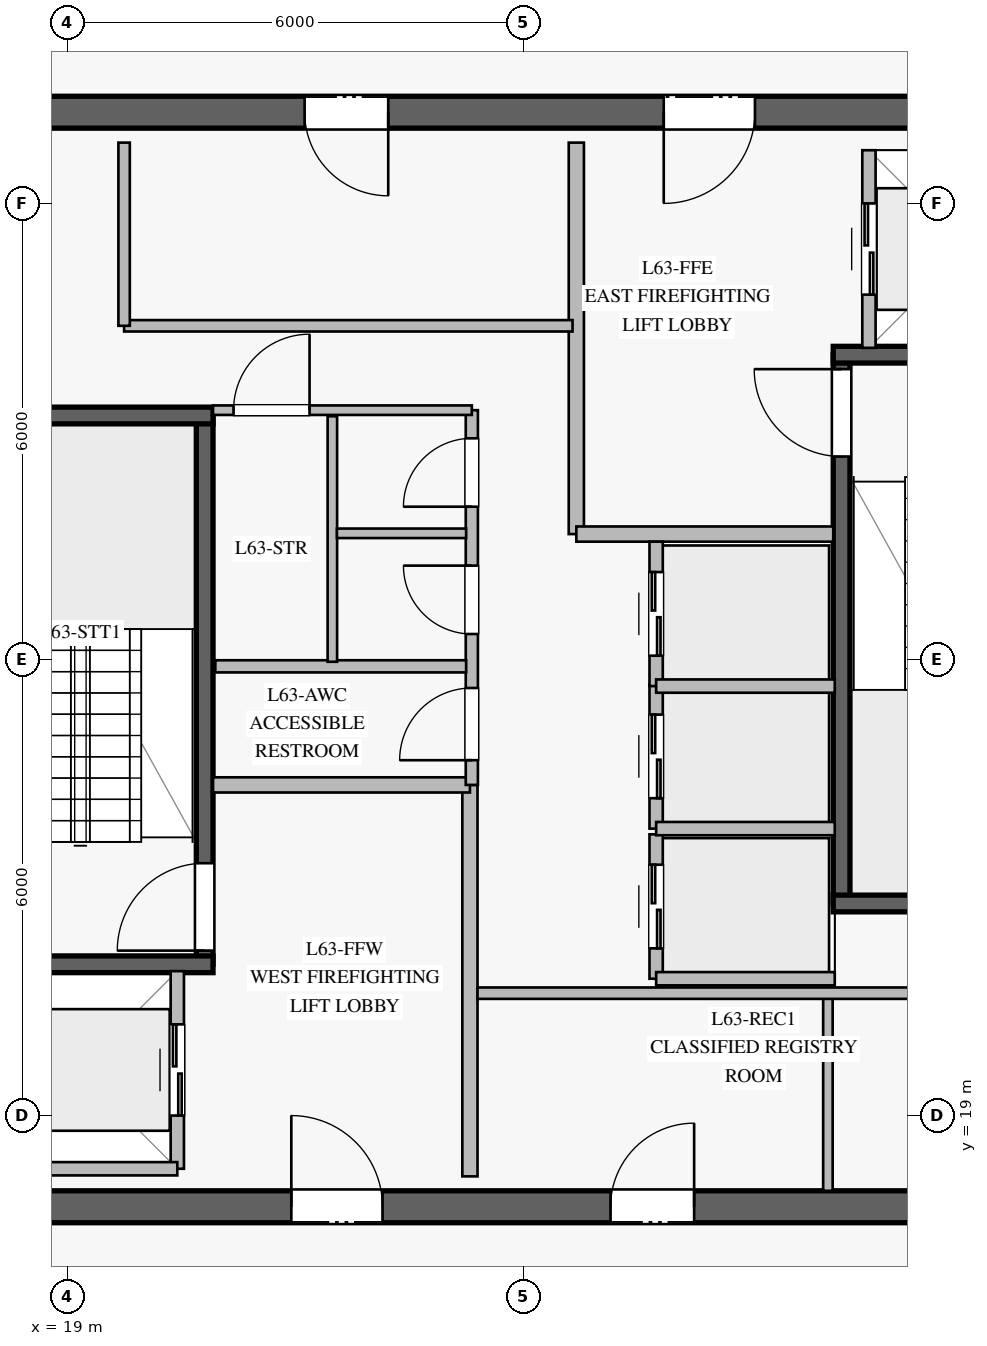
"""IFC4 building model, lengths in metres.
Left out: names, types, materials, properties, quantities, classifications, styles, units other than length and angle.
Written with IfcOpenShell. Run it as: python <this file> out.ifc"""

import sys

from ifc_helpers import new_model, si_unit, direction, frame, frame_2d, origin, place, context, subcontext, project, spatial, rectangle, extrude, element, fill, save


model = new_model("IFC4")
c1 = context("Model", 3, precision=1e-05, world=origin(), true_north=direction((0.0, 1.0)))
c2 = subcontext(c1, "Body", "Model", "MODEL_VIEW")
j1 = project(units=[si_unit("LENGTHUNIT", "METRE"), si_unit("PLANEANGLEUNIT", "RADIAN")], contexts=[c1])
p1 = place(None, origin())
s1 = spatial("IfcSite", under=j1, at=p1, CompositionType="ELEMENT")
p2 = place(p1, origin())
s2 = spatial("IfcBuilding", under=s1, at=p2, CompositionType="ELEMENT")
p3 = place(p2, frame((0.0, 0.0, 262.2)))
s3 = spatial("IfcBuildingStorey", under=s2, at=p3, CompositionType="ELEMENT", Elevation=262.2)
p4 = place(p3, frame((16.99, 17.8, 0.0), z_axis=(0.0, 0.0, 1.0), x_axis=(1.0, 0.0, 0.0)))
e1 = element("IfcWall", 1, at=p4, inside=s3, PredefinedType="SHEAR", context=c2, shape_type="SweptSolid", body=[
    extrude(rectangle(XDim=16.02, YDim=0.42, at=frame_2d((8.01, 0.0))), origin(), (0.0, 0.0, 1.0), 3.78),
])
p5 = place(p4, frame((4.96, 0.0, 0.0)))
e2 = element("IfcOpeningElement", 2, at=p5, cuts=e1, PredefinedType="OPENING", context=c2, shape_type="SweptSolid", body=[
    extrude(rectangle(XDim=1.2, YDim=2.25, at=frame_2d((0.6, 1.125))), frame((0.0, 0.22, 0.0), z_axis=(0.0, -1.0, 0.0), x_axis=(1.0, 0.0, 0.0)), (0.0, 0.0, 1.0), 0.44),
])
p6 = place(p4, frame((13.91, 0.0, 0.0)))
e3 = element("IfcOpeningElement", 3, at=p6, cuts=e1, PredefinedType="OPENING", context=c2, shape_type="SweptSolid", body=[
    extrude(rectangle(XDim=0.9, YDim=2.1, at=frame_2d((0.45, 1.05))), frame((0.0, 0.22, 0.0), z_axis=(0.0, -1.0, 0.0), x_axis=(1.0, 0.0, 0.0)), (0.0, 0.0, 1.0), 0.44),
])
p7 = place(p4, frame((9.16, 0.0, 0.0)))
e4 = element("IfcOpeningElement", 4, at=p7, cuts=e1, PredefinedType="OPENING", context=c2, shape_type="SweptSolid", body=[
    extrude(rectangle(XDim=1.1, YDim=2.2, at=frame_2d((0.55, 1.1))), frame((0.0, 0.22, 0.0), z_axis=(0.0, -1.0, 0.0), x_axis=(1.0, 0.0, 0.0)), (0.0, 0.0, 1.0), 0.44),
])
p8 = place(p3, frame((33.01, 32.2, 0.0), z_axis=(0.0, 0.0, 1.0), x_axis=(-1.0, 0.0, 0.0)))
e5 = element("IfcWall", 5, at=p8, inside=s3, PredefinedType="SHEAR", context=c2, shape_type="SweptSolid", body=[
    extrude(rectangle(XDim=16.02, YDim=0.42, at=frame_2d((8.01, 0.0))), origin(), (0.0, 0.0, 1.0), 3.78),
])
p9 = place(p8, frame((4.96, 0.0, 0.0)))
e6 = element("IfcOpeningElement", 6, at=p9, cuts=e5, PredefinedType="OPENING", context=c2, shape_type="SweptSolid", body=[
    extrude(rectangle(XDim=1.2, YDim=2.25, at=frame_2d((0.6, 1.125))), frame((0.0, 0.22, 0.0), z_axis=(0.0, -1.0, 0.0), x_axis=(1.0, 0.0, 0.0)), (0.0, 0.0, 1.0), 0.44),
])
p10 = place(p8, frame((9.785, 0.0, 0.0)))
e7 = element("IfcOpeningElement", 7, at=p10, cuts=e5, PredefinedType="OPENING", context=c2, shape_type="SweptSolid", body=[
    extrude(rectangle(XDim=1.1, YDim=2.2, at=frame_2d((0.55, 1.1))), frame((0.0, 0.22, 0.0), z_axis=(0.0, -1.0, 0.0), x_axis=(1.0, 0.0, 0.0)), (0.0, 0.0, 1.0), 0.44),
])
p11 = place(p3, frame((20.81, 20.99, 0.0), z_axis=(0.0, 0.0, 1.0), x_axis=(0.0, 1.0, 0.0)))
e8 = element("IfcWall", 8, at=p11, inside=s3, PredefinedType="SOLIDWALL", context=c2, shape_type="SweptSolid", body=[
    extrude(rectangle(XDim=7.22, YDim=0.22, at=frame_2d((3.61, 0.0))), origin(), (0.0, 0.0, 1.0), 3.78),
])
p12 = place(p11, frame((0.18, 0.0, 0.0)))
e9 = element("IfcOpeningElement", 9, at=p12, cuts=e8, PredefinedType="OPENING", context=c2, shape_type="SweptSolid", body=[
    extrude(rectangle(XDim=1.15, YDim=2.2, at=frame_2d((0.575, 1.1))), frame((0.0, 0.12, 0.0), z_axis=(0.0, -1.0, 0.0), x_axis=(1.0, 0.0, 0.0)), (0.0, 0.0, 1.0), 0.24),
])
for number, where, z_axis, x_axis in (
    (10, (17.2, 20.99, 0.0), (0.0, 0.0, 1.0), (1.0, 0.0, 0.0)),
    (11, (17.2, 28.21, 0.0), (0.0, 0.0, 1.0), (1.0, 0.0, 0.0)),
):
    element("IfcWall", number, at=place(p3, frame(where, z_axis=z_axis, x_axis=x_axis)), inside=s3, PredefinedType="SOLIDWALL", context=c2, shape_type="SweptSolid", body=[
        extrude(rectangle(XDim=3.72, YDim=0.22, at=frame_2d((1.86, 0.0))), origin(), (0.0, 0.0, 1.0), 3.78),
    ])
p13 = place(p3, frame((29.19, 21.79, 0.0), z_axis=(0.0, 0.0, 1.0), x_axis=(0.0, 1.0, 0.0)))
e12 = element("IfcWall", 12, at=p13, inside=s3, PredefinedType="SOLIDWALL", context=c2, shape_type="SweptSolid", body=[
    extrude(rectangle(XDim=7.22, YDim=0.22, at=frame_2d((3.61, 0.0))), origin(), (0.0, 0.0, 1.0), 3.78),
])
p14 = place(p13, frame((5.88, 0.0, 0.0)))
e13 = element("IfcOpeningElement", 13, at=p14, cuts=e12, PredefinedType="OPENING", context=c2, shape_type="SweptSolid", body=[
    extrude(rectangle(XDim=1.15, YDim=2.2, at=frame_2d((0.575, 1.1))), frame((0.0, 0.12, 0.0), z_axis=(0.0, -1.0, 0.0), x_axis=(1.0, 0.0, 0.0)), (0.0, 0.0, 1.0), 0.24),
])
for number, where, z_axis, x_axis in (
    (14, (29.08, 21.79, 0.0), (0.0, 0.0, 1.0), (1.0, 0.0, 0.0)),
    (15, (29.08, 29.01, 0.0), (0.0, 0.0, 1.0), (1.0, 0.0, 0.0)),
):
    element("IfcWall", number, at=place(p3, frame(where, z_axis=z_axis, x_axis=x_axis)), inside=s3, PredefinedType="SOLIDWALL", context=c2, shape_type="SweptSolid", body=[
        extrude(rectangle(XDim=3.72, YDim=0.22, at=frame_2d((1.86, 0.0))), origin(), (0.0, 0.0, 1.0), 3.78),
    ])
p15 = place(p3, frame((24.3, 18.2, 0.0), z_axis=(0.0, 0.0, 1.0), x_axis=(0.0, 1.0, 0.0)))
e16 = element("IfcWall", 16, at=p15, inside=s3, PredefinedType="PARTITIONING", context=c2, shape_type="SweptSolid", body=[
    extrude(rectangle(XDim=5.15, YDim=0.2, at=frame_2d((2.575, 0.0))), origin(), (0.0, 0.0, 1.0), 3.78),
])
p16 = place(p3, frame((20.92, 23.35, 0.0), z_axis=(0.0, 0.0, 1.0), x_axis=(1.0, 0.0, 0.0)))
e17 = element("IfcWall", 17, at=p16, inside=s3, PredefinedType="PARTITIONING", context=c2, shape_type="SweptSolid", body=[
    extrude(rectangle(XDim=3.38, YDim=0.2, at=frame_2d((1.69, 0.0))), origin(), (0.0, 0.0, 1.0), 3.78),
])
p17 = place(p3, frame((25.7, 26.65, 0.0), z_axis=(0.0, 0.0, 1.0), x_axis=(0.0, 1.0, 0.0)))
e18 = element("IfcWall", 18, at=p17, inside=s3, PredefinedType="PARTITIONING", context=c2, shape_type="SweptSolid", body=[
    extrude(rectangle(XDim=5.15, YDim=0.2, at=frame_2d((2.575, 0.0))), origin(), (0.0, 0.0, 1.0), 3.78),
])
p18 = place(p3, frame((25.7, 26.65, 0.0), z_axis=(0.0, 0.0, 1.0), x_axis=(1.0, 0.0, 0.0)))
e19 = element("IfcWall", 19, at=p18, inside=s3, PredefinedType="PARTITIONING", context=c2, shape_type="SweptSolid", body=[
    extrude(rectangle(XDim=3.38, YDim=0.2, at=frame_2d((1.69, 0.0))), origin(), (0.0, 0.0, 1.0), 3.78),
])
p19 = place(p3, frame((24.325, 23.35, 0.0), z_axis=(0.0, 0.0, 1.0), x_axis=(0.0, 1.0, 0.0)))
e20 = element("IfcWall", 20, at=p19, inside=s3, PredefinedType="PLUMBINGWALL", context=c2, shape_type="SweptSolid", body=[
    extrude(rectangle(XDim=4.93, YDim=0.16, at=frame_2d((2.465, 0.0))), origin(), (0.0, 0.0, 1.0), 3.78),
])
p20 = place(p19, frame((0.325, 0.0, 0.0)))
e21 = element("IfcOpeningElement", 21, at=p20, cuts=e20, PredefinedType="OPENING", context=c2, shape_type="SweptSolid", body=[
    extrude(rectangle(XDim=0.95, YDim=2.1, at=frame_2d((0.475, 1.05))), frame((0.0, 0.09, 0.0), z_axis=(0.0, -1.0, 0.0), x_axis=(1.0, 0.0, 0.0)), (0.0, 0.0, 1.0), 0.18),
])
p21 = place(p19, frame((1.985, 0.0, 0.0)))
e22 = element("IfcOpeningElement", 22, at=p21, cuts=e20, PredefinedType="OPENING", context=c2, shape_type="SweptSolid", body=[
    extrude(rectangle(XDim=0.9, YDim=2.1, at=frame_2d((0.45, 1.05))), frame((0.0, 0.09, 0.0), z_axis=(0.0, -1.0, 0.0), x_axis=(1.0, 0.0, 0.0)), (0.0, 0.0, 1.0), 0.18),
])
p22 = place(p19, frame((3.66, 0.0, 0.0)))
e23 = element("IfcOpeningElement", 23, at=p22, cuts=e20, PredefinedType="OPENING", context=c2, shape_type="SweptSolid", body=[
    extrude(rectangle(XDim=0.9, YDim=2.1, at=frame_2d((0.45, 1.05))), frame((0.0, 0.09, 0.0), z_axis=(0.0, -1.0, 0.0), x_axis=(1.0, 0.0, 0.0)), (0.0, 0.0, 1.0), 0.18),
])
p23 = place(p3, frame((20.92, 28.28, 0.0), z_axis=(0.0, 0.0, 1.0), x_axis=(1.0, 0.0, 0.0)))
e24 = element("IfcWall", 24, at=p23, inside=s3, PredefinedType="PARTITIONING", context=c2, shape_type="SweptSolid", body=[
    extrude(rectangle(XDim=3.405, YDim=0.125, at=frame_2d((1.703, 0.0))), origin(), (0.0, 0.0, 1.0), 3.78),
])
p24 = place(p23, frame((0.27, 0.0, 0.0)))
e25 = element("IfcOpeningElement", 25, at=p24, cuts=e24, PredefinedType="OPENING", context=c2, shape_type="SweptSolid", body=[
    extrude(rectangle(XDim=1.0, YDim=2.15, at=frame_2d((0.5, 1.075))), frame((0.0, 0.073, 0.0), z_axis=(0.0, -1.0, 0.0), x_axis=(1.0, 0.0, 0.0)), (0.0, 0.0, 1.0), 0.145),
])
p25 = place(p3, frame((29.01, 18.01, 0.0), z_axis=(0.0, 0.0, 1.0), x_axis=(0.0, 1.0, 0.0)))
e26 = element("IfcWall", 26, at=p25, inside=s3, PredefinedType="PARTITIONING", context=c2, shape_type="SweptSolid", body=[
    extrude(rectangle(XDim=2.54, YDim=0.125, at=frame_2d((1.27, 0.0))), origin(), (0.0, 0.0, 1.0), 3.08),
])
p26 = place(p3, frame((20.95, 24.91, 0.0), z_axis=(0.0, 0.0, 1.0), x_axis=(1.0, 0.0, 0.0)))
e27 = element("IfcWall", 27, at=p26, inside=s3, PredefinedType="PLUMBINGWALL", context=c2, shape_type="SweptSolid", body=[
    extrude(rectangle(XDim=3.3, YDim=0.16, at=frame_2d((1.65, 0.0))), origin(), (0.0, 0.0, 1.0), 3.78),
])
p27 = place(p3, frame((22.49, 24.97, 0.0), z_axis=(0.0, 0.0, 1.0), x_axis=(0.0, 1.0, 0.0)))
e28 = element("IfcWall", 28, at=p27, inside=s3, PredefinedType="PARTITIONING", context=c2, shape_type="SweptSolid", body=[
    extrude(rectangle(XDim=3.23, YDim=0.125, at=frame_2d((1.615, 0.0))), origin(), (0.0, 0.0, 1.0), 3.78),
])
p28 = place(p3, frame((22.55, 26.66, 0.0), z_axis=(0.0, 0.0, 1.0), x_axis=(1.0, 0.0, 0.0)))
e29 = element("IfcWall", 29, at=p28, inside=s3, PredefinedType="PARTITIONING", context=c2, shape_type="SweptSolid", body=[
    extrude(rectangle(XDim=1.7, YDim=0.125, at=frame_2d((0.85, 0.0))), origin(), (0.0, 0.0, 1.0), 3.78),
])
p29 = place(p3, frame((24.4, 20.61, 0.0), z_axis=(0.0, 0.0, 1.0), x_axis=(1.0, 0.0, 0.0)))
e30 = element("IfcWall", 30, at=p29, inside=s3, PredefinedType="PARTITIONING", context=c2, shape_type="SweptSolid", body=[
    extrude(rectangle(XDim=5.9, YDim=0.15, at=frame_2d((2.95, 0.0))), origin(), (0.0, 0.0, 1.0), 3.78),
])
p30 = place(p3, frame((19.75, 29.39, 0.0), z_axis=(0.0, 0.0, 1.0), x_axis=(1.0, 0.0, 0.0)))
e31 = element("IfcWall", 31, at=p30, inside=s3, PredefinedType="PARTITIONING", context=c2, shape_type="SweptSolid", body=[
    extrude(rectangle(XDim=5.9, YDim=0.15, at=frame_2d((2.95, 0.0))), origin(), (0.0, 0.0, 1.0), 3.78),
])
p31 = place(p3, frame((19.75, 29.39, 0.0), z_axis=(0.0, 0.0, 1.0), x_axis=(0.0, 1.0, 0.0)))
e32 = element("IfcWall", 32, at=p31, inside=s3, PredefinedType="PARTITIONING", context=c2, shape_type="SweptSolid", body=[
    extrude(rectangle(XDim=2.41, YDim=0.15, at=frame_2d((1.205, 0.0))), origin(), (0.0, 0.0, 1.0), 3.78),
])
p32 = place(p3, frame((26.75, 20.8, 0.0), z_axis=(0.0, 0.0, 1.0), x_axis=(0.0, 1.0, 0.0)))
e33 = element("IfcWall", 33, at=p32, inside=s3, PredefinedType="PARTITIONING", context=c2, shape_type="SweptSolid", body=[
    extrude(rectangle(XDim=1.9, YDim=0.175, at=frame_2d((0.95, 0.0))), origin(), (0.0, 0.0, 1.0), 3.78),
])
p33 = place(p32, frame((0.4, 0.0, 0.0)))
e34 = element("IfcOpeningElement", 34, at=p33, cuts=e33, PredefinedType="OPENING", context=c2, shape_type="SweptSolid", body=[
    extrude(rectangle(XDim=1.1, YDim=2.2, at=frame_2d((0.55, 1.1))), frame((0.0, 0.098, 0.0), z_axis=(0.0, -1.0, 0.0), x_axis=(1.0, 0.0, 0.0)), (0.0, 0.0, 1.0), 0.195),
])
p34 = place(p3, frame((26.75, 20.8, 0.0), z_axis=(0.0, 0.0, 1.0), x_axis=(1.0, 0.0, 0.0)))
e35 = element("IfcWall", 35, at=p34, inside=s3, PredefinedType="PARTITIONING", context=c2, shape_type="SweptSolid", body=[
    extrude(rectangle(XDim=2.35, YDim=0.175, at=frame_2d((1.175, 0.0))), origin(), (0.0, 0.0, 1.0), 3.78),
])
p35 = place(p3, frame((26.75, 22.775, 0.0), z_axis=(0.0, 0.0, 1.0), x_axis=(0.0, 1.0, 0.0)))
e36 = element("IfcWall", 36, at=p35, inside=s3, PredefinedType="PARTITIONING", context=c2, shape_type="SweptSolid", body=[
    extrude(rectangle(XDim=1.9, YDim=0.175, at=frame_2d((0.95, 0.0))), origin(), (0.0, 0.0, 1.0), 3.78),
])
p36 = place(p35, frame((0.4, 0.0, 0.0)))
e37 = element("IfcOpeningElement", 37, at=p36, cuts=e36, PredefinedType="OPENING", context=c2, shape_type="SweptSolid", body=[
    extrude(rectangle(XDim=1.1, YDim=2.2, at=frame_2d((0.55, 1.1))), frame((0.0, 0.098, 0.0), z_axis=(0.0, -1.0, 0.0), x_axis=(1.0, 0.0, 0.0)), (0.0, 0.0, 1.0), 0.195),
])
p37 = place(p3, frame((26.75, 22.775, 0.0), z_axis=(0.0, 0.0, 1.0), x_axis=(1.0, 0.0, 0.0)))
e38 = element("IfcWall", 38, at=p37, inside=s3, PredefinedType="PARTITIONING", context=c2, shape_type="SweptSolid", body=[
    extrude(rectangle(XDim=2.35, YDim=0.175, at=frame_2d((1.175, 0.0))), origin(), (0.0, 0.0, 1.0), 3.78),
])
p38 = place(p3, frame((26.75, 24.65, 0.0), z_axis=(0.0, 0.0, 1.0), x_axis=(0.0, 1.0, 0.0)))
e39 = element("IfcWall", 39, at=p38, inside=s3, PredefinedType="PARTITIONING", context=c2, shape_type="SweptSolid", body=[
    extrude(rectangle(XDim=1.9, YDim=0.175, at=frame_2d((0.95, 0.0))), origin(), (0.0, 0.0, 1.0), 3.78),
])
p39 = place(p38, frame((0.4, 0.0, 0.0)))
e40 = element("IfcOpeningElement", 40, at=p39, cuts=e39, PredefinedType="OPENING", context=c2, shape_type="SweptSolid", body=[
    extrude(rectangle(XDim=1.1, YDim=2.2, at=frame_2d((0.55, 1.1))), frame((0.0, 0.098, 0.0), z_axis=(0.0, -1.0, 0.0), x_axis=(1.0, 0.0, 0.0)), (0.0, 0.0, 1.0), 0.195),
])
p40 = place(p3, frame((26.75, 24.65, 0.0), z_axis=(0.0, 0.0, 1.0), x_axis=(1.0, 0.0, 0.0)))
e41 = element("IfcWall", 41, at=p40, inside=s3, PredefinedType="PARTITIONING", context=c2, shape_type="SweptSolid", body=[
    extrude(rectangle(XDim=2.35, YDim=0.175, at=frame_2d((1.175, 0.0))), origin(), (0.0, 0.0, 1.0), 3.78),
])
p41 = place(p3, frame((20.45, 18.3, 0.0), z_axis=(0.0, 0.0, 1.0), x_axis=(0.0, 1.0, 0.0)))
e42 = element("IfcWall", 42, at=p41, inside=s3, PredefinedType="PARTITIONING", context=c2, shape_type="SweptSolid", body=[
    extrude(rectangle(XDim=2.6, YDim=0.175, at=frame_2d((1.3, 0.0))), origin(), (0.0, 0.0, 1.0), 3.78),
])
p42 = place(p41, frame((0.7, 0.0, 0.0)))
e43 = element("IfcOpeningElement", 43, at=p42, cuts=e42, PredefinedType="OPENING", context=c2, shape_type="SweptSolid", body=[
    extrude(rectangle(XDim=1.2, YDim=2.2, at=frame_2d((0.6, 1.1))), frame((0.0, 0.098, 0.0), z_axis=(0.0, -1.0, 0.0), x_axis=(1.0, 0.0, 0.0)), (0.0, 0.0, 1.0), 0.195),
])
p43 = place(p3, frame((17.85, 18.3, 0.0), z_axis=(0.0, 0.0, 1.0), x_axis=(1.0, 0.0, 0.0)))
e44 = element("IfcWall", 44, at=p43, inside=s3, PredefinedType="PARTITIONING", context=c2, shape_type="SweptSolid", body=[
    extrude(rectangle(XDim=2.6, YDim=0.175, at=frame_2d((1.3, 0.0))), origin(), (0.0, 0.0, 1.0), 3.78),
])
p44 = place(p3, frame((29.55, 29.1, 0.0), z_axis=(0.0, 0.0, 1.0), x_axis=(0.0, 1.0, 0.0)))
e45 = element("IfcWall", 45, at=p44, inside=s3, PredefinedType="PARTITIONING", context=c2, shape_type="SweptSolid", body=[
    extrude(rectangle(XDim=2.6, YDim=0.175, at=frame_2d((1.3, 0.0))), origin(), (0.0, 0.0, 1.0), 3.78),
])
p45 = place(p44, frame((0.7, 0.0, 0.0)))
e46 = element("IfcOpeningElement", 46, at=p45, cuts=e45, PredefinedType="OPENING", context=c2, shape_type="SweptSolid", body=[
    extrude(rectangle(XDim=1.2, YDim=2.2, at=frame_2d((0.6, 1.1))), frame((0.0, 0.098, 0.0), z_axis=(0.0, -1.0, 0.0), x_axis=(1.0, 0.0, 0.0)), (0.0, 0.0, 1.0), 0.195),
])
p46 = place(p12, origin())
e47 = element("IfcDoor", 47, at=p46, inside=s3, OperationType="SINGLE_SWING_LEFT", PredefinedType="DOOR", context=c2, shape_type="SweptSolid", body=[
    extrude(rectangle(XDim=1.15, YDim=2.2, at=frame_2d((0.575, 1.1))), frame((0.0, 0.025, 0.0), z_axis=(0.0, -1.0, 0.0), x_axis=(1.0, 0.0, 0.0)), (0.0, 0.0, 1.0), 0.05),
])
fill(e9, e47)
p47 = place(p14, origin())
e48 = element("IfcDoor", 48, at=p47, inside=s3, OperationType="SINGLE_SWING_RIGHT", PredefinedType="DOOR", context=c2, shape_type="SweptSolid", body=[
    extrude(rectangle(XDim=1.15, YDim=2.2, at=frame_2d((0.575, 1.1))), frame((0.0, 0.025, 0.0), z_axis=(0.0, -1.0, 0.0), x_axis=(1.0, 0.0, 0.0)), (0.0, 0.0, 1.0), 0.05),
])
fill(e13, e48)
p48 = place(p5, origin())
e49 = element("IfcDoor", 49, at=p48, inside=s3, OperationType="SINGLE_SWING_LEFT", PredefinedType="DOOR", context=c2, shape_type="SweptSolid", body=[
    extrude(rectangle(XDim=1.2, YDim=2.25, at=frame_2d((0.6, 1.125))), frame((0.0, 0.025, 0.0), z_axis=(0.0, -1.0, 0.0), x_axis=(1.0, 0.0, 0.0)), (0.0, 0.0, 1.0), 0.05),
])
fill(e2, e49)
p49 = place(p9, origin())
e50 = element("IfcDoor", 50, at=p49, inside=s3, OperationType="SINGLE_SWING_RIGHT", PredefinedType="DOOR", context=c2, shape_type="SweptSolid", body=[
    extrude(rectangle(XDim=1.2, YDim=2.25, at=frame_2d((0.6, 1.125))), frame((0.0, 0.025, 0.0), z_axis=(0.0, -1.0, 0.0), x_axis=(1.0, 0.0, 0.0)), (0.0, 0.0, 1.0), 0.05),
])
fill(e6, e50)
p50 = place(p20, origin())
e51 = element("IfcDoor", 51, at=p50, inside=s3, OperationType="SINGLE_SWING_LEFT", PredefinedType="DOOR", context=c2, shape_type="SweptSolid", body=[
    extrude(rectangle(XDim=0.95, YDim=2.1, at=frame_2d((0.475, 1.05))), frame((0.0, 0.025, 0.0), z_axis=(0.0, -1.0, 0.0), x_axis=(1.0, 0.0, 0.0)), (0.0, 0.0, 1.0), 0.05),
])
fill(e21, e51)
p51 = place(p21, origin())
e52 = element("IfcDoor", 52, at=p51, inside=s3, OperationType="SINGLE_SWING_RIGHT", PredefinedType="DOOR", context=c2, shape_type="SweptSolid", body=[
    extrude(rectangle(XDim=0.9, YDim=2.1, at=frame_2d((0.45, 1.05))), frame((0.0, 0.025, 0.0), z_axis=(0.0, -1.0, 0.0), x_axis=(1.0, 0.0, 0.0)), (0.0, 0.0, 1.0), 0.05),
])
fill(e22, e52)
p52 = place(p22, origin())
e53 = element("IfcDoor", 53, at=p52, inside=s3, OperationType="SINGLE_SWING_LEFT", PredefinedType="DOOR", context=c2, shape_type="SweptSolid", body=[
    extrude(rectangle(XDim=0.9, YDim=2.1, at=frame_2d((0.45, 1.05))), frame((0.0, 0.025, 0.0), z_axis=(0.0, -1.0, 0.0), x_axis=(1.0, 0.0, 0.0)), (0.0, 0.0, 1.0), 0.05),
])
fill(e23, e53)
p53 = place(p24, origin())
e54 = element("IfcDoor", 54, at=p53, inside=s3, OperationType="SINGLE_SWING_RIGHT", PredefinedType="DOOR", context=c2, shape_type="SweptSolid", body=[
    extrude(rectangle(XDim=1.0, YDim=2.15, at=frame_2d((0.5, 1.075))), frame((0.0, 0.025, 0.0), z_axis=(0.0, -1.0, 0.0), x_axis=(1.0, 0.0, 0.0)), (0.0, 0.0, 1.0), 0.05),
])
fill(e25, e54)
p54 = place(p7, origin())
e55 = element("IfcDoor", 55, at=p54, inside=s3, OperationType="SINGLE_SWING_RIGHT", PredefinedType="DOOR", context=c2, shape_type="SweptSolid", body=[
    extrude(rectangle(XDim=1.1, YDim=2.2, at=frame_2d((0.55, 1.1))), frame((0.0, 0.025, 0.0), z_axis=(0.0, -1.0, 0.0), x_axis=(1.0, 0.0, 0.0)), (0.0, 0.0, 1.0), 0.05),
])
fill(e4, e55)
p55 = place(p10, origin())
e56 = element("IfcDoor", 56, at=p55, inside=s3, OperationType="SINGLE_SWING_LEFT", PredefinedType="DOOR", context=c2, shape_type="SweptSolid", body=[
    extrude(rectangle(XDim=1.1, YDim=2.2, at=frame_2d((0.55, 1.1))), frame((0.0, 0.025, 0.0), z_axis=(0.0, -1.0, 0.0), x_axis=(1.0, 0.0, 0.0)), (0.0, 0.0, 1.0), 0.05),
])
fill(e7, e56)
p56 = place(p33, origin())
e57 = element("IfcDoor", 57, at=p56, inside=s3, OperationType="DOUBLE_DOOR_SLIDING", PredefinedType="DOOR", context=c2, shape_type="SweptSolid", body=[
    extrude(rectangle(XDim=1.1, YDim=2.2, at=frame_2d((0.55, 1.1))), frame((0.0, 0.025, 0.0), z_axis=(0.0, -1.0, 0.0), x_axis=(1.0, 0.0, 0.0)), (0.0, 0.0, 1.0), 0.05),
])
fill(e34, e57)
p57 = place(p36, origin())
e58 = element("IfcDoor", 58, at=p57, inside=s3, OperationType="DOUBLE_DOOR_SLIDING", PredefinedType="DOOR", context=c2, shape_type="SweptSolid", body=[
    extrude(rectangle(XDim=1.1, YDim=2.2, at=frame_2d((0.55, 1.1))), frame((0.0, 0.025, 0.0), z_axis=(0.0, -1.0, 0.0), x_axis=(1.0, 0.0, 0.0)), (0.0, 0.0, 1.0), 0.05),
])
fill(e37, e58)
p58 = place(p39, origin())
e59 = element("IfcDoor", 59, at=p58, inside=s3, OperationType="DOUBLE_DOOR_SLIDING", PredefinedType="DOOR", context=c2, shape_type="SweptSolid", body=[
    extrude(rectangle(XDim=1.1, YDim=2.2, at=frame_2d((0.55, 1.1))), frame((0.0, 0.025, 0.0), z_axis=(0.0, -1.0, 0.0), x_axis=(1.0, 0.0, 0.0)), (0.0, 0.0, 1.0), 0.05),
])
fill(e40, e59)
p59 = place(p42, origin())
e60 = element("IfcDoor", 60, at=p59, inside=s3, OperationType="DOUBLE_DOOR_SLIDING", PredefinedType="DOOR", context=c2, shape_type="SweptSolid", body=[
    extrude(rectangle(XDim=1.2, YDim=2.2, at=frame_2d((0.6, 1.1))), frame((0.0, 0.025, 0.0), z_axis=(0.0, -1.0, 0.0), x_axis=(1.0, 0.0, 0.0)), (0.0, 0.0, 1.0), 0.05),
])
fill(e43, e60)
p60 = place(p45, origin())
e61 = element("IfcDoor", 61, at=p60, inside=s3, OperationType="DOUBLE_DOOR_SLIDING", PredefinedType="DOOR", context=c2, shape_type="SweptSolid", body=[
    extrude(rectangle(XDim=1.2, YDim=2.2, at=frame_2d((0.6, 1.1))), frame((0.0, 0.025, 0.0), z_axis=(0.0, -1.0, 0.0), x_axis=(1.0, 0.0, 0.0)), (0.0, 0.0, 1.0), 0.05),
])
fill(e46, e61)
save(model, sys.argv[1])
